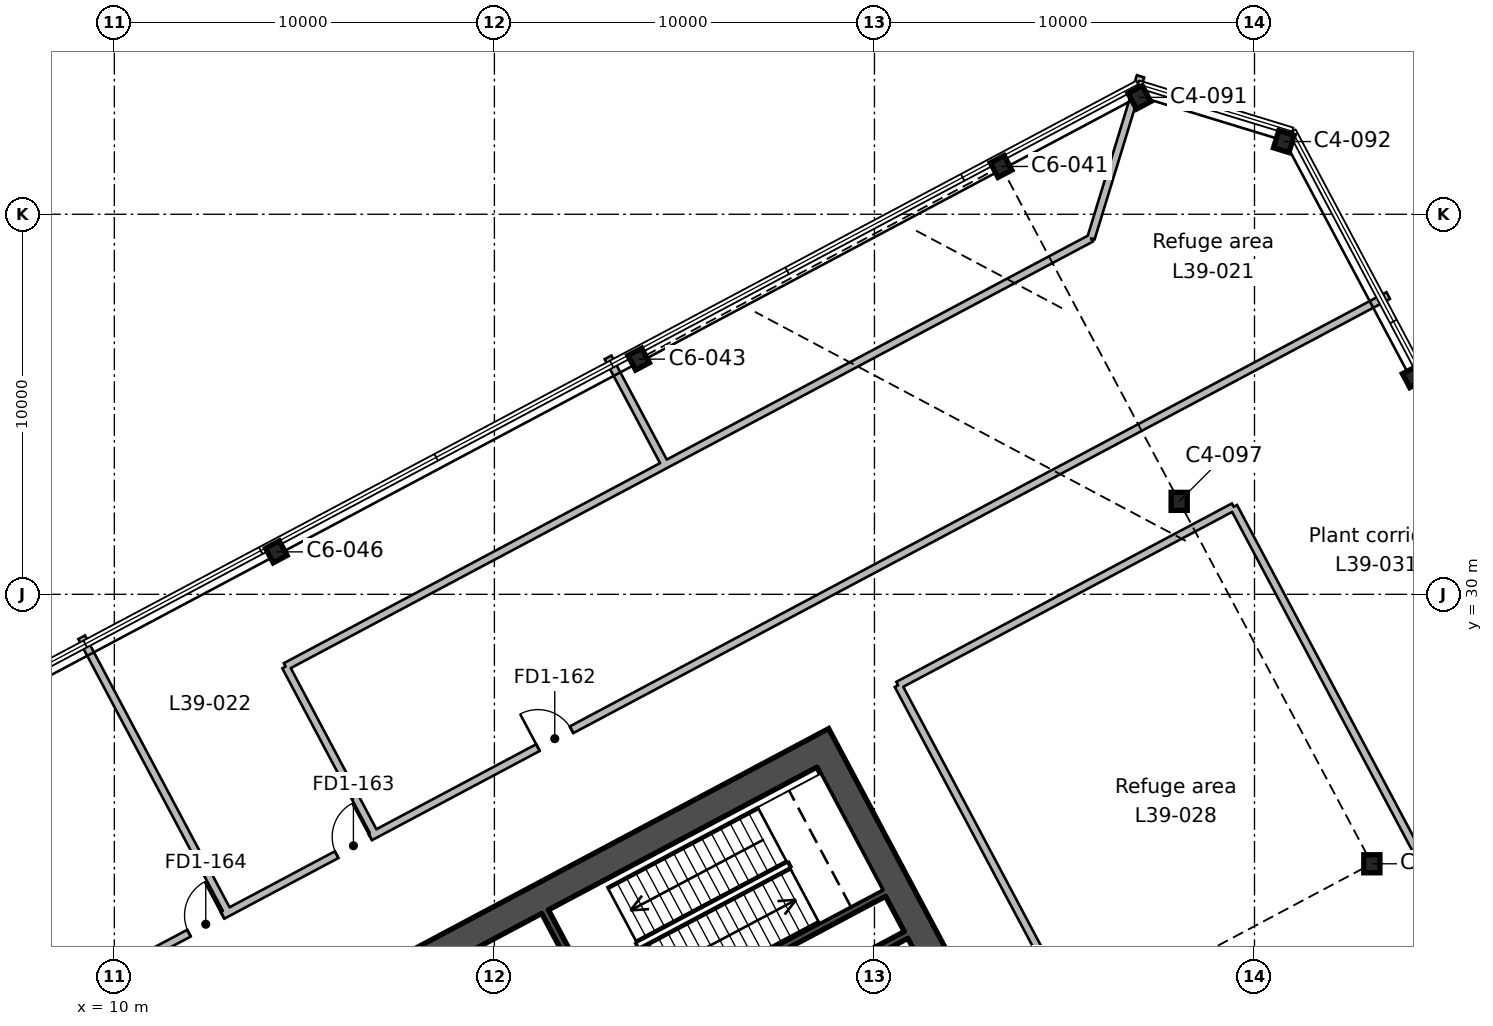
"""IFC4 building model, lengths in metres.
Left out: names, types, materials, properties, quantities, classifications, styles, units other than length and angle.
Written with IfcOpenShell. Run it as: python <this file> out.ifc"""

import sys

from ifc_helpers import new_model, si_unit, direction, frame, frame_2d, origin, origin_2d, place, context, subcontext, project, spatial, rectangle, i_section, extrude, element, fill, save


model = new_model("IFC4")
c1 = context("Model", 3, precision=1e-05, world=origin(), true_north=direction((0.0, 1.0)))
c2 = subcontext(c1, "Body", "Model", "MODEL_VIEW")
j1 = project(units=[si_unit("LENGTHUNIT", "METRE"), si_unit("PLANEANGLEUNIT", "RADIAN")], contexts=[c1])
p1 = place(None, origin())
s1 = spatial("IfcSite", under=j1, at=p1, CompositionType="ELEMENT")
p2 = place(p1, origin())
s2 = spatial("IfcBuilding", under=s1, at=p2, CompositionType="ELEMENT")
p3 = place(p2, frame((0.0, 0.0, 183.6)))
s3 = spatial("IfcBuildingStorey", under=s2, at=p3, CompositionType="ELEMENT", Elevation=183.6)
p4 = place(p3, frame((43.088, 22.91, 0.0), z_axis=(0.0, 0.0, 1.0), x_axis=(1.0, 0.0, 0.0)))
e1 = element("IfcColumn", 1, at=p4, inside=s3, PredefinedType="COLUMN", context=c2, shape_type="SweptSolid", body=[
    extrude(i_section(OverallWidth=0.424, OverallDepth=0.475, WebThickness=0.048, FlangeThickness=0.077, FilletRadius=0.015, at=origin_2d()), origin(), (0.0, 0.0, 1.0), 6.0),
])
p5 = place(p3, frame((14.261, 31.117, 0.0), z_axis=(0.0, 0.0, 1.0), x_axis=(-0.882947592859, -0.469471562786, 0.0)))
e2 = element("IfcColumn", 2, at=p5, inside=s3, PredefinedType="COLUMN", context=c2, shape_type="SweptSolid", body=[
    extrude(i_section(OverallWidth=0.412, OverallDepth=0.434, WebThickness=0.036, FlangeThickness=0.057, FilletRadius=0.015, at=origin_2d()), origin(), (0.0, 0.0, 1.0), 6.0),
])
p6 = place(p3, frame((38.018, 32.446, 0.0), z_axis=(0.0, 0.0, 1.0), x_axis=(1.0, 0.0, 0.0)))
e3 = element("IfcColumn", 3, at=p6, inside=s3, PredefinedType="COLUMN", context=c2, shape_type="SweptSolid", body=[
    extrude(i_section(OverallWidth=0.424, OverallDepth=0.475, WebThickness=0.048, FlangeThickness=0.077, FilletRadius=0.015, at=origin_2d()), origin(), (0.0, 0.0, 1.0), 6.0),
])
for number, where, z_axis, x_axis in (
    (4, (44.181, 35.723, 0.0), (0.0, 0.0, 1.0), (-0.469, 0.883, 0.0)),
    (5, (23.796, 36.188, 0.0), (0.0, 0.0, 1.0), (-0.883, -0.469, 0.0)),
    (6, (33.332, 41.258, 0.0), (0.0, 0.0, 1.0), (-0.883, -0.469, 0.0)),
):
    element("IfcColumn", number, at=place(p3, frame(where, z_axis=z_axis, x_axis=x_axis)), inside=s3, PredefinedType="COLUMN", context=c2, shape_type="SweptSolid", body=[
        extrude(i_section(OverallWidth=0.412, OverallDepth=0.434, WebThickness=0.036, FlangeThickness=0.057, FilletRadius=0.015, at=origin_2d()), origin(), (0.0, 0.0, 1.0), 6.0),
    ])
for number, where, z_axis, x_axis in (
    (7, (40.772, 41.913, 0.0), (0.0, 0.0, 1.0), (-0.956, 0.292, 0.0)),
    (8, (36.971, 43.076, 0.0), (0.0, 0.0, 1.0), (-0.883, -0.469, 0.0)),
):
    element("IfcColumn", number, at=place(p3, frame(where, z_axis=z_axis, x_axis=x_axis)), inside=s3, PredefinedType="COLUMN", context=c2, shape_type="SweptSolid", body=[
        extrude(i_section(OverallWidth=0.424, OverallDepth=0.475, WebThickness=0.048, FlangeThickness=0.077, FilletRadius=0.015, at=origin_2d()), origin(), (0.0, 0.0, 1.0), 6.0),
    ])
p7 = place(p3, frame((37.713, 8.896, 0.0), z_axis=(0.0, 0.0, 1.0), x_axis=(-0.469469918705, 0.88294846703, 0.0)))
e9 = element("IfcWall", 9, at=p7, inside=s3, PredefinedType="SHEAR", context=c2, shape_type="SweptSolid", body=[
    extrude(rectangle(XDim=19.7, YDim=0.75, at=frame_2d((9.85, 0.0))), origin(), (0.0, 0.0, 1.0), 6.0),
])
p8 = place(p7, frame((10.45, 0.0, 0.0)))
e10 = element("IfcOpeningElement", 10, at=p8, cuts=e9, PredefinedType="OPENING", context=c2, shape_type="SweptSolid", body=[
    extrude(rectangle(XDim=2.4, YDim=2.4, at=frame_2d((1.2, 1.2))), frame((0.0, 0.385, 0.0), z_axis=(0.0, -1.0, 0.0), x_axis=(1.0, 0.0, 0.0)), (0.0, 0.0, 1.0), 0.77),
])
p9 = place(p3, frame((10.474, 16.3, 0.0), z_axis=(0.0, 0.0, 1.0), x_axis=(0.88295010195, 0.469466843842, 0.0)))
e11 = element("IfcWall", 11, at=p9, inside=s3, PredefinedType="SHEAR", context=c2, shape_type="SweptSolid", body=[
    extrude(rectangle(XDim=20.2, YDim=0.75, at=frame_2d((10.1, 0.0))), origin(), (0.0, 0.0, 1.0), 6.0),
])
p10 = place(p3, frame((24.76, 15.204, 0.0), z_axis=(0.0, 0.0, 1.0), x_axis=(-0.469494272526, 0.882935517501, 0.0)))
e12 = element("IfcWall", 12, at=p10, inside=s3, PredefinedType="SHEAR", context=c2, shape_type="SweptSolid", body=[
    extrude(rectangle(XDim=7.3, YDim=0.2, at=frame_2d((3.65, 0.0))), origin(), (0.0, 0.0, 1.0), 6.0),
])
p11 = place(p10, frame((4.8, 0.0, 0.0)))
e13 = element("IfcOpeningElement", 13, at=p11, cuts=e12, PredefinedType="OPENING", context=c2, shape_type="SweptSolid", body=[
    extrude(rectangle(XDim=1.2, YDim=2.1, at=frame_2d((0.6, 1.05))), frame((0.0, 0.11, 0.0), z_axis=(0.0, -1.0, 0.0), x_axis=(1.0, 0.0, 0.0)), (0.0, 0.0, 1.0), 0.22),
])
p12 = place(p3, frame((23.769, 17.282, 0.0), z_axis=(0.0, 0.0, 1.0), x_axis=(0.882940221191, 0.469485426614, 0.0)))
e14 = element("IfcWall", 14, at=p12, inside=s3, PredefinedType="SHEAR", context=c2, shape_type="SweptSolid", body=[
    extrude(rectangle(XDim=8.0, YDim=0.2, at=frame_2d((4.0, 0.0))), origin(), (0.0, 0.0, 1.0), 6.0),
])
p13 = place(p3, frame((23.182, 18.385, 0.0), z_axis=(0.0, 0.0, 1.0), x_axis=(0.88295287151, 0.469461634952, 0.0)))
e15 = element("IfcWall", 15, at=p13, inside=s3, PredefinedType="SHEAR", context=c2, shape_type="SweptSolid", body=[
    extrude(rectangle(XDim=8.0, YDim=0.2, at=frame_2d((4.0, 0.0))), origin(), (0.0, 0.0, 1.0), 6.0),
])
p14 = place(p3, frame((0.0, 14.723, 0.0), z_axis=(0.0, 0.0, 1.0), x_axis=(0.882950329887, 0.469466415149, 0.0)))
e16 = element("IfcWall", 16, at=p14, inside=s3, PredefinedType="PARTITIONING", context=c2, shape_type="SweptSolid", body=[
    extrude(rectangle(XDim=49.288, YDim=0.2, at=frame_2d((24.644, 0.0))), origin(), (0.0, 0.0, 1.0), 5.55),
])
p15 = place(p14, frame((23.95, 0.0, 0.0)))
e17 = element("IfcOpeningElement", 17, at=p15, cuts=e16, PredefinedType="OPENING", context=c2, shape_type="SweptSolid", body=[
    extrude(rectangle(XDim=1.0, YDim=2.1, at=frame_2d((0.5, 1.05))), frame((0.0, 0.11, 0.0), z_axis=(0.0, -1.0, 0.0), x_axis=(1.0, 0.0, 0.0)), (0.0, 0.0, 1.0), 0.22),
])
p16 = place(p14, frame((17.95, 0.0, 0.0)))
e18 = element("IfcOpeningElement", 18, at=p16, cuts=e16, PredefinedType="OPENING", context=c2, shape_type="SweptSolid", body=[
    extrude(rectangle(XDim=1.0, YDim=2.1, at=frame_2d((0.5, 1.05))), frame((0.0, 0.11, 0.0), z_axis=(0.0, -1.0, 0.0), x_axis=(1.0, 0.0, 0.0)), (0.0, 0.0, 1.0), 0.22),
])
p17 = place(p14, frame((13.55, 0.0, 0.0)))
e19 = element("IfcOpeningElement", 19, at=p17, cuts=e16, PredefinedType="OPENING", context=c2, shape_type="SweptSolid", body=[
    extrude(rectangle(XDim=1.0, YDim=2.1, at=frame_2d((0.5, 1.05))), frame((0.0, 0.11, 0.0), z_axis=(0.0, -1.0, 0.0), x_axis=(1.0, 0.0, 0.0)), (0.0, 0.0, 1.0), 0.22),
])
p18 = place(p3, frame((9.14, 28.87, 0.0), z_axis=(0.0, 0.0, 1.0), x_axis=(0.46950928143, -0.882927536467, 0.0)))
e20 = element("IfcWall", 20, at=p18, inside=s3, PredefinedType="PARTITIONING", context=c2, shape_type="SweptSolid", body=[
    extrude(rectangle(XDim=8.2, YDim=0.2, at=frame_2d((4.1, 0.0))), origin(), (0.0, 0.0, 1.0), 5.55),
])
p19 = place(p3, frame((14.507, 28.1, 0.0), z_axis=(0.0, 0.0, 1.0), x_axis=(0.469275799922, -0.883051653986, 0.0)))
e21 = element("IfcWall", 21, at=p19, inside=s3, PredefinedType="PARTITIONING", context=c2, shape_type="SweptSolid", body=[
    extrude(rectangle(XDim=4.984, YDim=0.2, at=frame_2d((2.492, 0.0))), origin(), (0.0, 0.0, 1.0), 5.55),
])
p20 = place(p3, frame((14.506, 28.099, 0.0), z_axis=(0.0, 0.0, 1.0), x_axis=(0.882940729559, 0.469484470548, 0.0)))
e22 = element("IfcWall", 22, at=p20, inside=s3, PredefinedType="PARTITIONING", context=c2, shape_type="SweptSolid", body=[
    extrude(rectangle(XDim=11.312, YDim=0.2, at=frame_2d((5.656, 0.0))), origin(), (0.0, 0.0, 1.0), 5.55),
])
p21 = place(p3, frame((22.991, 36.235, 0.0), z_axis=(0.0, 0.0, 1.0), x_axis=(0.469653460539, -0.882850852072, 0.0)))
e23 = element("IfcWall", 23, at=p21, inside=s3, PredefinedType="PARTITIONING", context=c2, shape_type="SweptSolid", body=[
    extrude(rectangle(XDim=3.2, YDim=0.2, at=frame_2d((1.6, 0.0))), origin(), (0.0, 0.0, 1.0), 5.55),
])
p22 = place(p3, frame((24.494, 33.41, 0.0), z_axis=(0.0, 0.0, 1.0), x_axis=(0.882940274122, 0.46948532707, 0.0)))
e24 = element("IfcWall", 24, at=p22, inside=s3, PredefinedType="PARTITIONING", context=c2, shape_type="SweptSolid", body=[
    extrude(rectangle(XDim=12.688, YDim=0.2, at=frame_2d((6.344, 0.0))), origin(), (0.0, 0.0, 1.0), 5.55),
])
p23 = place(p3, frame((35.697, 39.367, 0.0), z_axis=(0.0, 0.0, 1.0), x_axis=(0.292503752717, 0.956264374871, 0.0)))
e25 = element("IfcWall", 25, at=p23, inside=s3, PredefinedType="PARTITIONING", context=c2, shape_type="SweptSolid", body=[
    extrude(rectangle(XDim=4.458, YDim=0.2, at=frame_2d((2.229, 0.0))), origin(), (0.0, 0.0, 1.0), 5.55),
])
p24 = place(p3, frame((30.623, 27.608, 0.0), z_axis=(0.0, 0.0, 1.0), x_axis=(0.882940863385, 0.469484218867, 0.0)))
e26 = element("IfcWall", 26, at=p24, inside=s3, PredefinedType="PARTITIONING", context=c2, shape_type="SweptSolid", body=[
    extrude(rectangle(XDim=10.0, YDim=0.2, at=frame_2d((5.0, 0.0))), origin(), (0.0, 0.0, 1.0), 5.55),
])
p25 = place(p3, frame((39.453, 32.303, 0.0), z_axis=(0.0, 0.0, 1.0), x_axis=(0.469461333319, -0.882953031887, 0.0)))
e27 = element("IfcWall", 27, at=p25, inside=s3, PredefinedType="PARTITIONING", context=c2, shape_type="SweptSolid", body=[
    extrude(rectangle(XDim=20.0, YDim=0.2, at=frame_2d((10.0, 0.0))), origin(), (0.0, 0.0, 1.0), 5.55),
])
p26 = place(p3, frame((40.013, 9.949, 0.0), z_axis=(0.0, 0.0, 1.0), x_axis=(-0.469489882812, 0.882937851685, 0.0)))
e28 = element("IfcWall", 28, at=p26, inside=s3, PredefinedType="PARTITIONING", context=c2, shape_type="SweptSolid", body=[
    extrude(rectangle(XDim=20.0, YDim=0.2, at=frame_2d((10.0, 0.0))), origin(), (0.0, 0.0, 1.0), 5.55),
])
p27 = place(p26, frame((9.55, 0.0, 0.0)))
e29 = element("IfcOpeningElement", 29, at=p27, cuts=e28, PredefinedType="OPENING", context=c2, shape_type="SweptSolid", body=[
    extrude(rectangle(XDim=1.0, YDim=2.1, at=frame_2d((0.5, 1.05))), frame((0.0, 0.11, 0.0), z_axis=(0.0, -1.0, 0.0), x_axis=(1.0, 0.0, 0.0)), (0.0, 0.0, 1.0), 0.22),
])
p28 = place(p15, origin())
e30 = element("IfcDoor", 30, at=p28, inside=s3, OperationType="SINGLE_SWING_LEFT", PredefinedType="DOOR", context=c2, shape_type="SweptSolid", body=[
    extrude(rectangle(XDim=1.0, YDim=2.1, at=frame_2d((0.5, 1.05))), frame((0.0, 0.025, 0.0), z_axis=(0.0, -1.0, 0.0), x_axis=(1.0, 0.0, 0.0)), (0.0, 0.0, 1.0), 0.05),
])
fill(e17, e30)
p29 = place(p16, origin())
e31 = element("IfcDoor", 31, at=p29, inside=s3, OperationType="SINGLE_SWING_RIGHT", PredefinedType="DOOR", context=c2, shape_type="SweptSolid", body=[
    extrude(rectangle(XDim=1.0, YDim=2.1, at=frame_2d((0.5, 1.05))), frame((0.0, 0.025, 0.0), z_axis=(0.0, -1.0, 0.0), x_axis=(1.0, 0.0, 0.0)), (0.0, 0.0, 1.0), 0.05),
])
fill(e18, e31)
p30 = place(p17, origin())
e32 = element("IfcDoor", 32, at=p30, inside=s3, OperationType="SINGLE_SWING_RIGHT", PredefinedType="DOOR", context=c2, shape_type="SweptSolid", body=[
    extrude(rectangle(XDim=1.0, YDim=2.1, at=frame_2d((0.5, 1.05))), frame((0.0, 0.025, 0.0), z_axis=(0.0, -1.0, 0.0), x_axis=(1.0, 0.0, 0.0)), (0.0, 0.0, 1.0), 0.05),
])
fill(e19, e32)
save(model, sys.argv[1])
